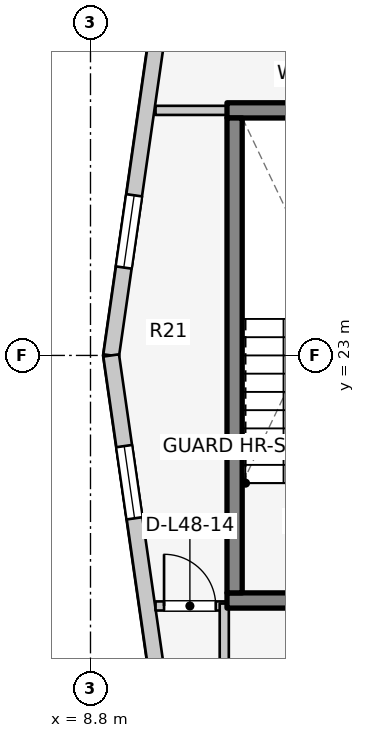
"""IFC4 building model, lengths in metres.
Left out: names, types, materials, properties, quantities, classifications, styles, units other than length and angle.
Written with IfcOpenShell. Run it as: python <this file> out.ifc"""

import sys

from ifc_helpers import new_model, si_unit, direction, frame, frame_2d, origin, place, context, subcontext, project, spatial, rectangle, extrude, element, fill, save


model = new_model("IFC4")
c1 = context("Model", 3, precision=1e-05, world=origin(), true_north=direction((0.0, 1.0)))
c2 = subcontext(c1, "Body", "Model", "MODEL_VIEW")
j1 = project(units=[si_unit("LENGTHUNIT", "METRE"), si_unit("PLANEANGLEUNIT", "RADIAN")], contexts=[c1])
p1 = place(None, origin())
s1 = spatial("IfcSite", under=j1, at=p1, CompositionType="ELEMENT")
p2 = place(p1, origin())
s2 = spatial("IfcBuilding", under=s1, at=p2, CompositionType="ELEMENT")
p3 = place(p2, frame((0.0, 0.0, 159.1)))
s3 = spatial("IfcBuildingStorey", under=s2, at=p3, CompositionType="ELEMENT", Elevation=159.1)
p4 = place(p3, frame((11.045, 18.97, 0.0), z_axis=(0.0, 0.0, 1.0), x_axis=(1.0, 0.0, 0.0)))
e1 = element("IfcWall", 1, at=p4, inside=s3, PredefinedType="SOLIDWALL", context=c2, shape_type="SweptSolid", body=[
    extrude(rectangle(XDim=3.782, YDim=0.25, at=frame_2d((1.891, 0.0))), origin(), (0.0, 0.0, 1.0), 3.1),
])
p5 = place(p4, frame((1.135, 0.0, 0.0)))
e2 = element("IfcOpeningElement", 2, at=p5, cuts=e1, PredefinedType="OPENING", context=c2, shape_type="SweptSolid", body=[
    extrude(rectangle(XDim=1.1, YDim=2.1, at=frame_2d((0.55, 1.05))), frame((0.0, 0.135, 0.0), z_axis=(0.0, -1.0, 0.0), x_axis=(1.0, 0.0, 0.0)), (0.0, 0.0, 1.0), 0.27),
])
p6 = place(p3, frame((11.045, 27.03, 0.0), z_axis=(0.0, 0.0, 1.0), x_axis=(1.0, 0.0, 0.0)))
e3 = element("IfcWall", 3, at=p6, inside=s3, PredefinedType="SOLIDWALL", context=c2, shape_type="SweptSolid", body=[
    extrude(rectangle(XDim=3.782, YDim=0.25, at=frame_2d((1.891, 0.0))), origin(), (0.0, 0.0, 1.0), 3.1),
])
p7 = place(p3, frame((11.17, 19.095, 0.0), z_axis=(0.0, 0.0, 1.0), x_axis=(0.0, 1.0, 0.0)))
e4 = element("IfcWall", 4, at=p7, inside=s3, PredefinedType="SOLIDWALL", context=c2, shape_type="SweptSolid", body=[
    extrude(rectangle(XDim=7.81, YDim=0.25, at=frame_2d((3.905, 0.0))), origin(), (0.0, 0.0, 1.0), 3.1),
])
p8 = place(p3, frame((9.93, 28.497, 0.0), z_axis=(0.0, 0.0, 1.0), x_axis=(-0.142227632286, -0.989833976288, 0.0)))
e5 = element("IfcWall", 5, at=p8, inside=s3, PredefinedType="STANDARD", context=c2, shape_type="SweptSolid", body=[
    extrude(rectangle(XDim=5.553, YDim=0.26, at=frame_2d((2.776, 0.0))), origin(), (0.0, 0.0, 1.0), 2.57),
])
p9 = place(p8, frame((2.892, 0.0, 0.75)))
e6 = element("IfcOpeningElement", 6, at=p9, cuts=e5, PredefinedType="OPENING", context=c2, shape_type="SweptSolid", body=[
    extrude(rectangle(XDim=1.2, YDim=1.5, at=frame_2d((0.6, 0.75))), frame((0.0, 0.14, 0.0), z_axis=(0.0, -1.0, 0.0), x_axis=(1.0, 0.0, 0.0)), (0.0, 0.0, 1.0), 0.28),
])
p10 = place(p3, frame((9.14, 23.0, 0.0), z_axis=(0.0, 0.0, 1.0), x_axis=(0.142227632286, -0.989833976288, 0.0)))
e7 = element("IfcWall", 7, at=p10, inside=s3, PredefinedType="STANDARD", context=c2, shape_type="SweptSolid", body=[
    extrude(rectangle(XDim=5.553, YDim=0.26, at=frame_2d((2.776, 0.0))), origin(), (0.0, 0.0, 1.0), 2.57),
])
p11 = place(p10, frame((1.506, 0.0, 0.75)))
e8 = element("IfcOpeningElement", 8, at=p11, cuts=e7, PredefinedType="OPENING", context=c2, shape_type="SweptSolid", body=[
    extrude(rectangle(XDim=1.2, YDim=1.5, at=frame_2d((0.6, 0.75))), frame((0.0, 0.14, 0.0), z_axis=(0.0, -1.0, 0.0), x_axis=(1.0, 0.0, 0.0)), (0.0, 0.0, 1.0), 0.28),
])
p12 = place(p3, frame((9.87, 27.03, 0.0), z_axis=(0.0, 0.0, 1.0), x_axis=(1.0, 0.0, 0.0)))
e9 = element("IfcWall", 9, at=p12, inside=s3, PredefinedType="PARTITIONING", context=c2, shape_type="SweptSolid", body=[
    extrude(rectangle(XDim=1.17, YDim=0.15, at=frame_2d((0.585, 0.0))), origin(), (0.0, 0.0, 1.0), 2.575),
])
p13 = place(p3, frame((9.87, 18.88, 0.0), z_axis=(0.0, 0.0, 1.0), x_axis=(1.0, 0.0, 0.0)))
e10 = element("IfcWall", 10, at=p13, inside=s3, PredefinedType="PARTITIONING", context=c2, shape_type="SweptSolid", body=[
    extrude(rectangle(XDim=1.17, YDim=0.15, at=frame_2d((0.585, 0.0))), origin(), (0.0, 0.0, 1.0), 2.575),
])
p14 = place(p13, frame((0.14, 0.0, 0.0)))
e11 = element("IfcOpeningElement", 11, at=p14, cuts=e10, PredefinedType="OPENING", context=c2, shape_type="SweptSolid", body=[
    extrude(rectangle(XDim=0.85, YDim=2.05, at=frame_2d((0.425, 1.025))), frame((0.0, 0.085, 0.0), z_axis=(0.0, -1.0, 0.0), x_axis=(1.0, 0.0, 0.0)), (0.0, 0.0, 1.0), 0.17),
])
p15 = place(p3, frame((11.0, 15.91, 0.0), z_axis=(0.0, 0.0, 1.0), x_axis=(0.0, 1.0, 0.0)))
e12 = element("IfcWall", 12, at=p15, inside=s3, PredefinedType="PARTITIONING", context=c2, shape_type="SweptSolid", body=[
    extrude(rectangle(XDim=3.01, YDim=0.15, at=frame_2d((1.505, 0.0))), origin(), (0.0, 0.0, 1.0), 2.575),
])
p16 = place(p9, origin())
e13 = element("IfcWindow", 13, at=p16, inside=s3, PartitioningType="SINGLE_PANEL", PredefinedType="WINDOW", context=c2, shape_type="SweptSolid", body=[
    extrude(rectangle(XDim=1.2, YDim=1.5, at=frame_2d((0.6, 0.75))), frame((0.0, 0.03, 0.0), z_axis=(0.0, -1.0, 0.0), x_axis=(1.0, 0.0, 0.0)), (0.0, 0.0, 1.0), 0.06),
])
fill(e6, e13)
p17 = place(p11, origin())
e14 = element("IfcWindow", 14, at=p17, inside=s3, PartitioningType="SINGLE_PANEL", PredefinedType="WINDOW", context=c2, shape_type="SweptSolid", body=[
    extrude(rectangle(XDim=1.2, YDim=1.5, at=frame_2d((0.6, 0.75))), frame((0.0, 0.03, 0.0), z_axis=(0.0, -1.0, 0.0), x_axis=(1.0, 0.0, 0.0)), (0.0, 0.0, 1.0), 0.06),
])
fill(e8, e14)
p18 = place(p14, origin())
e15 = element("IfcDoor", 15, at=p18, inside=s3, OperationType="SINGLE_SWING_LEFT", PredefinedType="DOOR", context=c2, shape_type="SweptSolid", body=[
    extrude(rectangle(XDim=0.85, YDim=2.05, at=frame_2d((0.425, 1.025))), frame((0.0, 0.025, 0.0), z_axis=(0.0, -1.0, 0.0), x_axis=(1.0, 0.0, 0.0)), (0.0, 0.0, 1.0), 0.05),
])
fill(e11, e15)
save(model, sys.argv[1])
